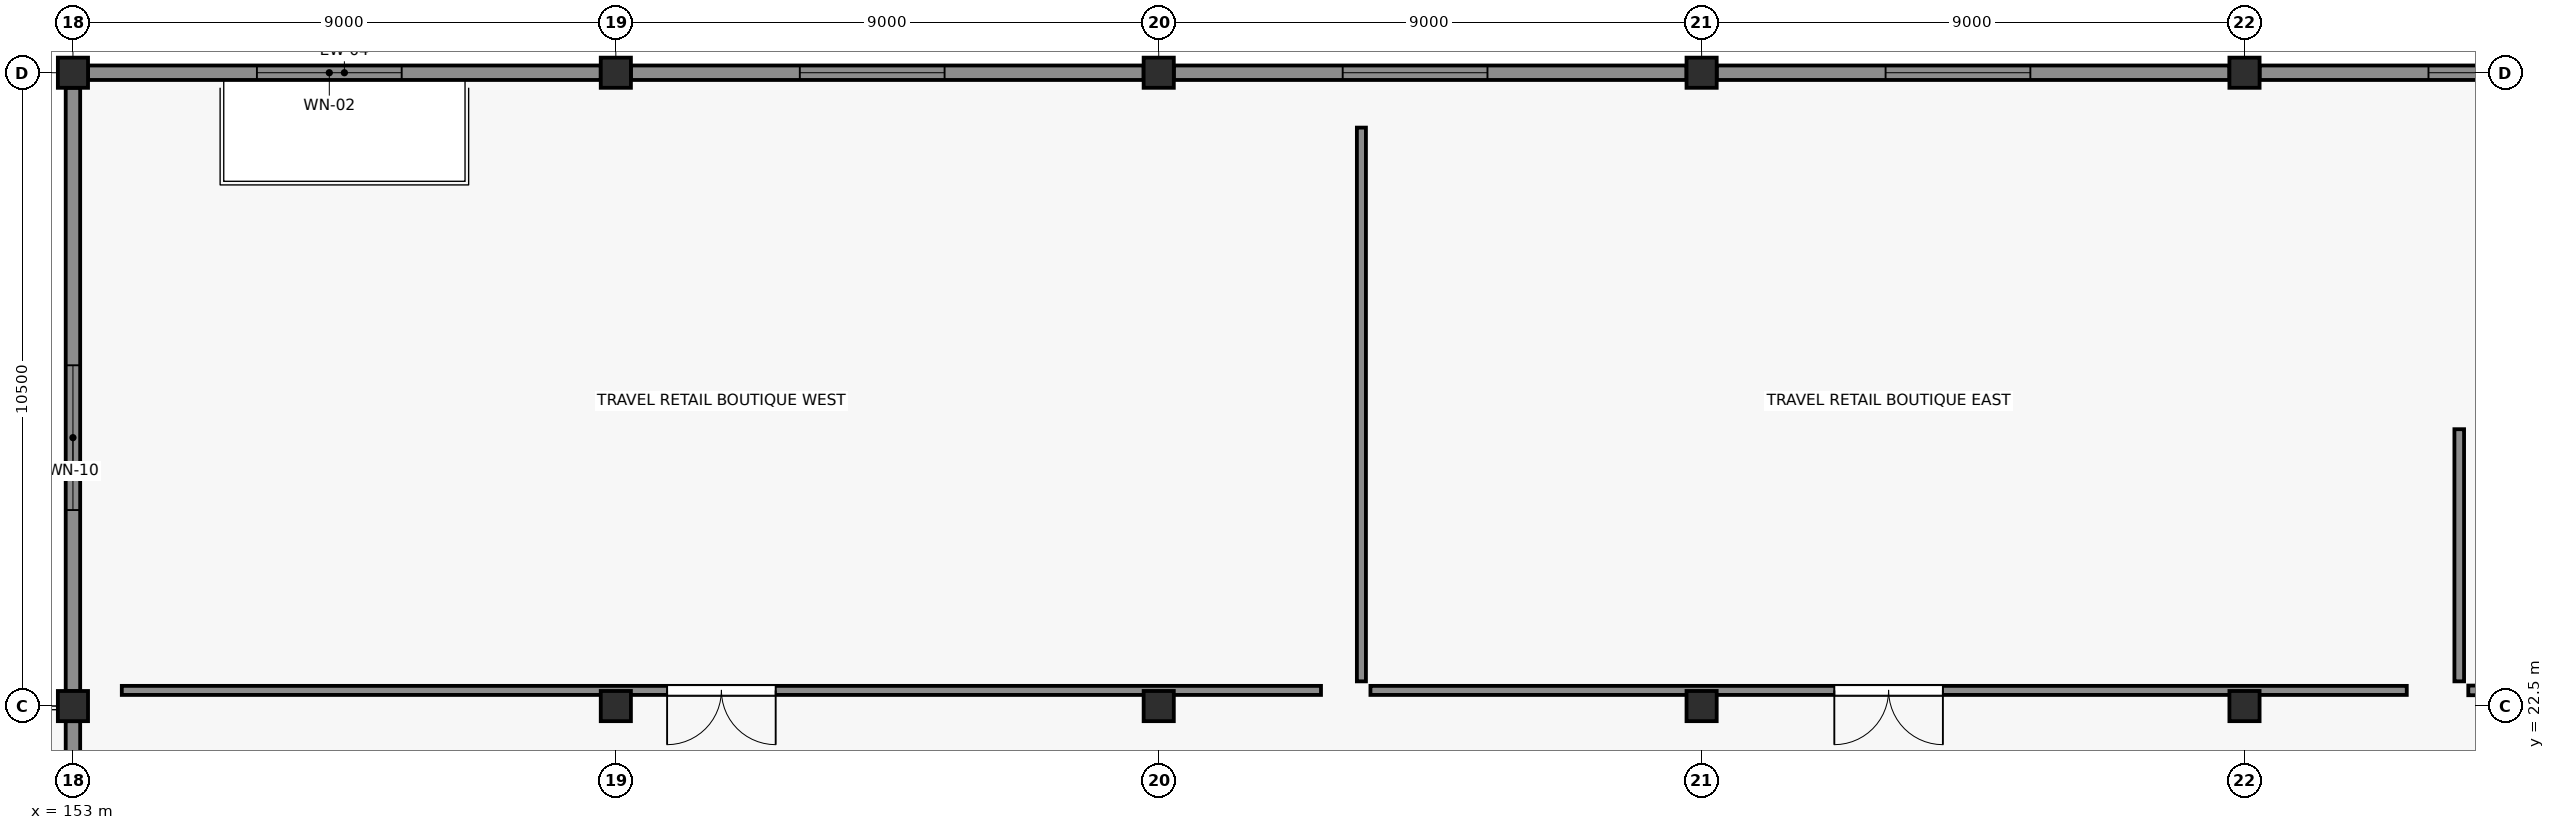
"""IFC4 building model, lengths in metres.
Left out: names, types, materials, properties, quantities, classifications, styles, units other than length and angle.
Written with IfcOpenShell. Run it as: python <this file> out.ifc"""

import sys

from ifc_helpers import new_model, si_unit, direction, frame, frame_2d, origin, origin_2d, place, context, subcontext, project, spatial, rectangle, extrude, element, fill, save


model = new_model("IFC4")
c1 = context("Model", 3, precision=1e-05, world=origin(), true_north=direction((0.0, 1.0)))
c2 = subcontext(c1, "Body", "Model", "MODEL_VIEW")
j1 = project(units=[si_unit("LENGTHUNIT", "METRE"), si_unit("PLANEANGLEUNIT", "RADIAN")], contexts=[c1])
p1 = place(None, origin())
s1 = spatial("IfcSite", under=j1, at=p1, CompositionType="ELEMENT")
p2 = place(p1, origin())
s2 = spatial("IfcBuilding", under=s1, at=p2, CompositionType="ELEMENT")
p3 = place(p2, frame((0.0, 0.0, 9.8)))
s3 = spatial("IfcBuildingStorey", under=s2, at=p3, CompositionType="ELEMENT", Elevation=9.8)
for number, where, z_axis, x_axis in (
    (1, (153.0, 22.5, 0.0), (0.0, 0.0, 1.0), (1.0, 0.0, 0.0)),
    (2, (153.0, 33.0, 0.0), (0.0, 0.0, 1.0), (1.0, 0.0, 0.0)),
    (3, (162.0, 22.5, 0.0), (0.0, 0.0, 1.0), (1.0, 0.0, 0.0)),
    (4, (162.0, 33.0, 0.0), (0.0, 0.0, 1.0), (1.0, 0.0, 0.0)),
    (5, (171.0, 22.5, 0.0), (0.0, 0.0, 1.0), (1.0, 0.0, 0.0)),
    (6, (171.0, 33.0, 0.0), (0.0, 0.0, 1.0), (1.0, 0.0, 0.0)),
    (7, (180.0, 22.5, 0.0), (0.0, 0.0, 1.0), (1.0, 0.0, 0.0)),
    (8, (180.0, 33.0, 0.0), (0.0, 0.0, 1.0), (1.0, 0.0, 0.0)),
    (9, (189.0, 22.5, 0.0), (0.0, 0.0, 1.0), (1.0, 0.0, 0.0)),
    (10, (189.0, 33.0, 0.0), (0.0, 0.0, 1.0), (1.0, 0.0, 0.0)),
):
    element("IfcColumn", number, at=place(p3, frame(where, z_axis=z_axis, x_axis=x_axis)), inside=s3, PredefinedType="COLUMN", context=c2, shape_type="SweptSolid", body=[
        extrude(rectangle(XDim=0.5, YDim=0.5, at=origin_2d()), origin(), (0.0, 0.0, 1.0), 4.87),
    ])
p4 = place(p3, frame((153.25, 33.0, 0.0), z_axis=(0.0, 0.0, 1.0), x_axis=(1.0, 0.0, 0.0)))
e11 = element("IfcWall", 11, at=p4, inside=s3, PredefinedType="SOLIDWALL", context=c2, shape_type="SweptSolid", body=[
    extrude(rectangle(XDim=8.5, YDim=0.24, at=frame_2d((4.25, 0.0))), origin(), (0.0, 0.0, 1.0), 4.39),
])
p5 = place(p4, frame((2.8, 0.0, 1.1)))
e12 = element("IfcOpeningElement", 12, at=p5, cuts=e11, PredefinedType="OPENING", context=c2, shape_type="SweptSolid", body=[
    extrude(rectangle(XDim=2.4, YDim=1.6, at=frame_2d((1.2, 0.8))), frame((0.0, 0.13, 0.0), z_axis=(0.0, -1.0, 0.0), x_axis=(1.0, 0.0, 0.0)), (0.0, 0.0, 1.0), 0.26),
])
p6 = place(p3, frame((162.25, 33.0, 0.0), z_axis=(0.0, 0.0, 1.0), x_axis=(1.0, 0.0, 0.0)))
e13 = element("IfcWall", 13, at=p6, inside=s3, PredefinedType="SOLIDWALL", context=c2, shape_type="SweptSolid", body=[
    extrude(rectangle(XDim=8.5, YDim=0.24, at=frame_2d((4.25, 0.0))), origin(), (0.0, 0.0, 1.0), 4.39),
])
p7 = place(p6, frame((2.8, 0.0, 1.1)))
e14 = element("IfcOpeningElement", 14, at=p7, cuts=e13, PredefinedType="OPENING", context=c2, shape_type="SweptSolid", body=[
    extrude(rectangle(XDim=2.4, YDim=1.6, at=frame_2d((1.2, 0.8))), frame((0.0, 0.13, 0.0), z_axis=(0.0, -1.0, 0.0), x_axis=(1.0, 0.0, 0.0)), (0.0, 0.0, 1.0), 0.26),
])
p8 = place(p3, frame((171.25, 33.0, 0.0), z_axis=(0.0, 0.0, 1.0), x_axis=(1.0, 0.0, 0.0)))
e15 = element("IfcWall", 15, at=p8, inside=s3, PredefinedType="SOLIDWALL", context=c2, shape_type="SweptSolid", body=[
    extrude(rectangle(XDim=8.5, YDim=0.24, at=frame_2d((4.25, 0.0))), origin(), (0.0, 0.0, 1.0), 4.39),
])
p9 = place(p8, frame((2.8, 0.0, 1.1)))
e16 = element("IfcOpeningElement", 16, at=p9, cuts=e15, PredefinedType="OPENING", context=c2, shape_type="SweptSolid", body=[
    extrude(rectangle(XDim=2.4, YDim=1.6, at=frame_2d((1.2, 0.8))), frame((0.0, 0.13, 0.0), z_axis=(0.0, -1.0, 0.0), x_axis=(1.0, 0.0, 0.0)), (0.0, 0.0, 1.0), 0.26),
])
p10 = place(p3, frame((180.25, 33.0, 0.0), z_axis=(0.0, 0.0, 1.0), x_axis=(1.0, 0.0, 0.0)))
e17 = element("IfcWall", 17, at=p10, inside=s3, PredefinedType="SOLIDWALL", context=c2, shape_type="SweptSolid", body=[
    extrude(rectangle(XDim=8.5, YDim=0.24, at=frame_2d((4.25, 0.0))), origin(), (0.0, 0.0, 1.0), 4.39),
])
p11 = place(p10, frame((2.8, 0.0, 1.1)))
e18 = element("IfcOpeningElement", 18, at=p11, cuts=e17, PredefinedType="OPENING", context=c2, shape_type="SweptSolid", body=[
    extrude(rectangle(XDim=2.4, YDim=1.6, at=frame_2d((1.2, 0.8))), frame((0.0, 0.13, 0.0), z_axis=(0.0, -1.0, 0.0), x_axis=(1.0, 0.0, 0.0)), (0.0, 0.0, 1.0), 0.26),
])
p12 = place(p3, frame((189.25, 33.0, 0.0), z_axis=(0.0, 0.0, 1.0), x_axis=(1.0, 0.0, 0.0)))
e19 = element("IfcWall", 19, at=p12, inside=s3, PredefinedType="SOLIDWALL", context=c2, shape_type="SweptSolid", body=[
    extrude(rectangle(XDim=8.5, YDim=0.24, at=frame_2d((4.25, 0.0))), origin(), (0.0, 0.0, 1.0), 4.39),
])
p13 = place(p12, frame((2.8, 0.0, 1.1)))
e20 = element("IfcOpeningElement", 20, at=p13, cuts=e19, PredefinedType="OPENING", context=c2, shape_type="SweptSolid", body=[
    extrude(rectangle(XDim=2.4, YDim=1.6, at=frame_2d((1.2, 0.8))), frame((0.0, 0.13, 0.0), z_axis=(0.0, -1.0, 0.0), x_axis=(1.0, 0.0, 0.0)), (0.0, 0.0, 1.0), 0.26),
])
p14 = place(p3, frame((153.0, 11.25, 0.0), z_axis=(0.0, 0.0, 1.0), x_axis=(0.0, 1.0, 0.0)))
e21 = element("IfcWall", 21, at=p14, inside=s3, PredefinedType="SOLIDWALL", context=c2, shape_type="SweptSolid", body=[
    extrude(rectangle(XDim=11.0, YDim=0.24, at=frame_2d((5.5, 0.0))), origin(), (0.0, 0.0, 1.0), 4.39),
])
p15 = place(p3, frame((153.0, 22.75, 0.0), z_axis=(0.0, 0.0, 1.0), x_axis=(0.0, 1.0, 0.0)))
e22 = element("IfcWall", 22, at=p15, inside=s3, PredefinedType="SOLIDWALL", context=c2, shape_type="SweptSolid", body=[
    extrude(rectangle(XDim=10.0, YDim=0.24, at=frame_2d((5.0, 0.0))), origin(), (0.0, 0.0, 1.0), 4.39),
])
p16 = place(p15, frame((3.0, 0.0, 1.0)))
e23 = element("IfcOpeningElement", 23, at=p16, cuts=e22, PredefinedType="OPENING", context=c2, shape_type="SweptSolid", body=[
    extrude(rectangle(XDim=2.4, YDim=2.1, at=frame_2d((1.2, 1.05))), frame((0.0, 0.13, 0.0), z_axis=(0.0, -1.0, 0.0), x_axis=(1.0, 0.0, 0.0)), (0.0, 0.0, 1.0), 0.26),
])
p17 = place(p3, frame((173.69, 22.76, 0.0), z_axis=(0.0, 0.0, 1.0), x_axis=(-1.0, 0.0, 0.0)))
e24 = element("IfcWall", 24, at=p17, inside=s3, PredefinedType="PARTITIONING", context=c2, shape_type="SweptSolid", body=[
    extrude(rectangle(XDim=19.88, YDim=0.15, at=frame_2d((9.94, 0.0))), origin(), (0.0, 0.0, 1.0), 4.44),
])
p18 = place(p17, frame((9.04, 0.0, 0.0)))
e25 = element("IfcOpeningElement", 25, at=p18, cuts=e24, PredefinedType="OPENING", context=c2, shape_type="SweptSolid", body=[
    extrude(rectangle(XDim=1.8, YDim=2.3, at=frame_2d((0.9, 1.15))), frame((0.0, 0.085, 0.0), z_axis=(0.0, -1.0, 0.0), x_axis=(1.0, 0.0, 0.0)), (0.0, 0.0, 1.0), 0.17),
])
p19 = place(p3, frame((191.69, 22.76, 0.0), z_axis=(0.0, 0.0, 1.0), x_axis=(-1.0, 0.0, 0.0)))
e26 = element("IfcWall", 26, at=p19, inside=s3, PredefinedType="PARTITIONING", context=c2, shape_type="SweptSolid", body=[
    extrude(rectangle(XDim=17.18, YDim=0.15, at=frame_2d((8.59, 0.0))), origin(), (0.0, 0.0, 1.0), 4.44),
])
p20 = place(p19, frame((7.69, 0.0, 0.0)))
e27 = element("IfcOpeningElement", 27, at=p20, cuts=e26, PredefinedType="OPENING", context=c2, shape_type="SweptSolid", body=[
    extrude(rectangle(XDim=1.8, YDim=2.3, at=frame_2d((0.9, 1.15))), frame((0.0, 0.085, 0.0), z_axis=(0.0, -1.0, 0.0), x_axis=(1.0, 0.0, 0.0)), (0.0, 0.0, 1.0), 0.17),
])
p21 = place(p3, frame((174.36, 22.91, 0.0), z_axis=(0.0, 0.0, 1.0), x_axis=(0.0, 1.0, 0.0)))
e28 = element("IfcWall", 28, at=p21, inside=s3, PredefinedType="PARTITIONING", context=c2, shape_type="SweptSolid", body=[
    extrude(rectangle(XDim=9.18, YDim=0.15, at=frame_2d((4.59, 0.0))), origin(), (0.0, 0.0, 1.0), 4.8),
])
p22 = place(p3, frame((196.89, 22.76, 0.0), z_axis=(0.0, 0.0, 1.0), x_axis=(-1.0, 0.0, 0.0)))
e29 = element("IfcWall", 29, at=p22, inside=s3, PredefinedType="PARTITIONING", context=c2, shape_type="SweptSolid", body=[
    extrude(rectangle(XDim=4.18, YDim=0.16, at=frame_2d((2.09, 0.0))), origin(), (0.0, 0.0, 1.0), 4.44),
])
p23 = place(p22, frame((1.615, 0.0, 0.0)))
e30 = element("IfcOpeningElement", 30, at=p23, cuts=e29, PredefinedType="OPENING", context=c2, shape_type="SweptSolid", body=[
    extrude(rectangle(XDim=0.95, YDim=2.15, at=frame_2d((0.475, 1.075))), frame((0.0, 0.09, 0.0), z_axis=(0.0, -1.0, 0.0), x_axis=(1.0, 0.0, 0.0)), (0.0, 0.0, 1.0), 0.18),
])
p24 = place(p3, frame((192.56, 22.91, 0.0), z_axis=(0.0, 0.0, 1.0), x_axis=(0.0, 1.0, 0.0)))
e31 = element("IfcWall", 31, at=p24, inside=s3, PredefinedType="PARTITIONING", context=c2, shape_type="SweptSolid", body=[
    extrude(rectangle(XDim=4.18, YDim=0.16, at=frame_2d((2.09, 0.0))), origin(), (0.0, 0.0, 1.0), 4.8),
])
p25 = place(p5, origin())
e32 = element("IfcWindow", 32, at=p25, inside=s3, PartitioningType="SINGLE_PANEL", PredefinedType="WINDOW", context=c2, shape_type="SweptSolid", body=[
    extrude(rectangle(XDim=2.4, YDim=1.6, at=frame_2d((1.2, 0.8))), frame((0.0, 0.03, 0.0), z_axis=(0.0, -1.0, 0.0), x_axis=(1.0, 0.0, 0.0)), (0.0, 0.0, 1.0), 0.06),
])
fill(e12, e32)
p26 = place(p7, origin())
e33 = element("IfcWindow", 33, at=p26, inside=s3, PartitioningType="SINGLE_PANEL", PredefinedType="WINDOW", context=c2, shape_type="SweptSolid", body=[
    extrude(rectangle(XDim=2.4, YDim=1.6, at=frame_2d((1.2, 0.8))), frame((0.0, 0.03, 0.0), z_axis=(0.0, -1.0, 0.0), x_axis=(1.0, 0.0, 0.0)), (0.0, 0.0, 1.0), 0.06),
])
fill(e14, e33)
p27 = place(p9, origin())
e34 = element("IfcWindow", 34, at=p27, inside=s3, PartitioningType="SINGLE_PANEL", PredefinedType="WINDOW", context=c2, shape_type="SweptSolid", body=[
    extrude(rectangle(XDim=2.4, YDim=1.6, at=frame_2d((1.2, 0.8))), frame((0.0, 0.03, 0.0), z_axis=(0.0, -1.0, 0.0), x_axis=(1.0, 0.0, 0.0)), (0.0, 0.0, 1.0), 0.06),
])
fill(e16, e34)
p28 = place(p11, origin())
e35 = element("IfcWindow", 35, at=p28, inside=s3, PartitioningType="SINGLE_PANEL", PredefinedType="WINDOW", context=c2, shape_type="SweptSolid", body=[
    extrude(rectangle(XDim=2.4, YDim=1.6, at=frame_2d((1.2, 0.8))), frame((0.0, 0.03, 0.0), z_axis=(0.0, -1.0, 0.0), x_axis=(1.0, 0.0, 0.0)), (0.0, 0.0, 1.0), 0.06),
])
fill(e18, e35)
p29 = place(p13, origin())
e36 = element("IfcWindow", 36, at=p29, inside=s3, PartitioningType="SINGLE_PANEL", PredefinedType="WINDOW", context=c2, shape_type="SweptSolid", body=[
    extrude(rectangle(XDim=2.4, YDim=1.6, at=frame_2d((1.2, 0.8))), frame((0.0, 0.03, 0.0), z_axis=(0.0, -1.0, 0.0), x_axis=(1.0, 0.0, 0.0)), (0.0, 0.0, 1.0), 0.06),
])
fill(e20, e36)
p30 = place(p16, origin())
e37 = element("IfcWindow", 37, at=p30, inside=s3, PartitioningType="SINGLE_PANEL", PredefinedType="WINDOW", context=c2, shape_type="SweptSolid", body=[
    extrude(rectangle(XDim=2.4, YDim=2.1, at=frame_2d((1.2, 1.05))), frame((0.0, 0.03, 0.0), z_axis=(0.0, -1.0, 0.0), x_axis=(1.0, 0.0, 0.0)), (0.0, 0.0, 1.0), 0.06),
])
fill(e23, e37)
p31 = place(p18, origin())
e38 = element("IfcDoor", 38, at=p31, inside=s3, OperationType="DOUBLE_DOOR_SINGLE_SWING", PredefinedType="DOOR", context=c2, shape_type="SweptSolid", body=[
    extrude(rectangle(XDim=1.8, YDim=2.3, at=frame_2d((0.9, 1.15))), frame((0.0, 0.025, 0.0), z_axis=(0.0, -1.0, 0.0), x_axis=(1.0, 0.0, 0.0)), (0.0, 0.0, 1.0), 0.05),
])
fill(e25, e38)
p32 = place(p20, origin())
e39 = element("IfcDoor", 39, at=p32, inside=s3, OperationType="DOUBLE_DOOR_SINGLE_SWING", PredefinedType="DOOR", context=c2, shape_type="SweptSolid", body=[
    extrude(rectangle(XDim=1.8, YDim=2.3, at=frame_2d((0.9, 1.15))), frame((0.0, 0.025, 0.0), z_axis=(0.0, -1.0, 0.0), x_axis=(1.0, 0.0, 0.0)), (0.0, 0.0, 1.0), 0.05),
])
fill(e27, e39)
save(model, sys.argv[1])
